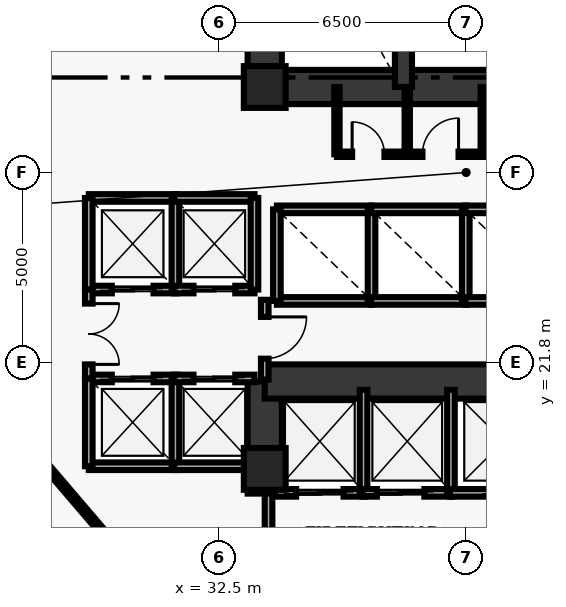
"""IFC4 building model, lengths in metres.
Left out: names, types, materials, properties, quantities, classifications, styles, units other than length and angle.
Written with IfcOpenShell. Run it as: python <this file> out.ifc"""

import sys

from ifc_helpers import new_model, si_unit, direction, frame, frame_2d, origin, origin_2d, place, context, subcontext, project, spatial, rectangle, extrude, element, fill, save


model = new_model("IFC4")
c1 = context("Model", 3, precision=1e-05, world=origin(), true_north=direction((0.0, 1.0)))
c2 = subcontext(c1, "Body", "Model", "MODEL_VIEW")
j1 = project(units=[si_unit("LENGTHUNIT", "METRE"), si_unit("PLANEANGLEUNIT", "RADIAN")], contexts=[c1])
p1 = place(None, origin())
s1 = spatial("IfcSite", under=j1, at=p1, CompositionType="ELEMENT")
p2 = place(p1, origin())
s2 = spatial("IfcBuilding", under=s1, at=p2, CompositionType="ELEMENT")
p3 = place(p2, frame((0.0, 0.0, 6.0)))
s3 = spatial("IfcBuildingStorey", under=s2, at=p3, CompositionType="ELEMENT", Elevation=6.0)
for number, where, z_axis, x_axis in (
    (1, (33.7, 19.0, 0.0), (0.0, 0.0, 1.0), (1.0, 0.0, 0.0)),
    (2, (33.7, 29.05, 0.0), (0.0, 0.0, 1.0), (1.0, 0.0, 0.0)),
):
    element("IfcColumn", number, at=place(p3, frame(where, z_axis=z_axis, x_axis=x_axis)), inside=s3, PredefinedType="PILASTER", context=c2, shape_type="SweptSolid", body=[
        extrude(rectangle(XDim=1.1, YDim=1.1, at=origin_2d()), origin(), (0.0, 0.0, 1.0), 4.7),
    ])
p4 = place(p3, frame((33.7, 29.05, 0.0), z_axis=(0.0, 0.0, 1.0), x_axis=(0.0, 1.0, 0.0)))
e3 = element("IfcWall", 3, at=p4, inside=s3, PredefinedType="SHEAR", context=c2, shape_type="SweptSolid", body=[
    extrude(rectangle(XDim=8.35, YDim=0.9, at=frame_2d((4.175, 0.0))), origin(), (0.0, 0.0, 1.0), 4.7),
])
p5 = place(p3, frame((33.7, 18.35, 0.0), z_axis=(0.0, 0.0, 1.0), x_axis=(0.0, 1.0, 0.0)))
e4 = element("IfcWall", 4, at=p5, inside=s3, PredefinedType="SHEAR", context=c2, shape_type="SweptSolid", body=[
    extrude(rectangle(XDim=2.95, YDim=0.9, at=frame_2d((1.475, 0.0))), origin(), (0.0, 0.0, 1.0), 4.7),
])
p6 = place(p3, frame((33.7, 29.05, 0.0), z_axis=(0.0, 0.0, 1.0), x_axis=(1.0, 0.0, 0.0)))
e5 = element("IfcWall", 5, at=p6, inside=s3, PredefinedType="SHEAR", context=c2, shape_type="SweptSolid", body=[
    extrude(rectangle(XDim=10.6, YDim=0.9, at=frame_2d((5.3, 0.0))), origin(), (0.0, 0.0, 1.0), 4.7),
])
p7 = place(p3, frame((33.7, 21.3, 0.0), z_axis=(0.0, 0.0, 1.0), x_axis=(1.0, 0.0, 0.0)))
e6 = element("IfcWall", 6, at=p7, inside=s3, PredefinedType="SHEAR", context=c2, shape_type="SweptSolid", body=[
    extrude(rectangle(XDim=7.55, YDim=0.9, at=frame_2d((3.775, 0.0))), origin(), (0.0, 0.0, 1.0), 4.7),
])
p8 = place(p3, frame((37.35, 29.05, 0.0), z_axis=(0.0, 0.0, 1.0), x_axis=(0.0, 1.0, 0.0)))
e7 = element("IfcWall", 7, at=p8, inside=s3, PredefinedType="SHEAR", context=c2, shape_type="SweptSolid", body=[
    extrude(rectangle(XDim=8.35, YDim=0.45, at=frame_2d((4.175, 0.0))), origin(), (0.0, 0.0, 1.0), 4.7),
])
p9 = place(p3, frame((35.6, 27.28, 0.0), z_axis=(0.0, 0.0, 1.0), x_axis=(0.0, 1.0, 0.0)))
e8 = element("IfcWall", 8, at=p9, inside=s3, PredefinedType="PARTITIONING", context=c2, shape_type="SweptSolid", body=[
    extrude(rectangle(XDim=1.77, YDim=0.14, at=frame_2d((0.885, 0.0))), origin(), (0.0, 0.0, 1.0), 4.7),
])
p10 = place(p3, frame((29.07, 23.72, 0.0), z_axis=(0.0, 0.0, 1.0), x_axis=(1.0, 0.0, 0.0)))
e9 = element("IfcWall", 9, at=p10, inside=s3, PredefinedType="SOLIDWALL", context=c2, shape_type="SweptSolid", body=[
    extrude(rectangle(XDim=2.31, YDim=0.2, at=frame_2d((1.155, 0.0))), origin(), (0.0, 0.0, 1.0), 4.7),
])
p11 = place(p10, frame((0.605, 0.0, 0.0)))
e10 = element("IfcOpeningElement", 10, at=p11, cuts=e9, PredefinedType="OPENING", context=c2, shape_type="SweptSolid", body=[
    extrude(rectangle(XDim=1.1, YDim=2.15, at=frame_2d((0.55, 1.075))), frame((0.0, 0.11, 0.0), z_axis=(0.0, -1.0, 0.0), x_axis=(1.0, 0.0, 0.0)), (0.0, 0.0, 1.0), 0.22),
])
p12 = place(p3, frame((29.07, 26.13, 0.0), z_axis=(0.0, 0.0, 1.0), x_axis=(1.0, 0.0, 0.0)))
e11 = element("IfcWall", 11, at=p12, inside=s3, PredefinedType="SOLIDWALL", context=c2, shape_type="SweptSolid", body=[
    extrude(rectangle(XDim=2.31, YDim=0.2, at=frame_2d((1.155, 0.0))), origin(), (0.0, 0.0, 1.0), 4.7),
])
for number, where, z_axis, x_axis in (
    (12, (29.07, 23.72, 0.0), (0.0, 0.0, 1.0), (0.0, 1.0, 0.0)),
    (13, (31.35, 23.72, 0.0), (0.0, 0.0, 1.0), (0.0, 1.0, 0.0)),
):
    element("IfcWall", number, at=place(p3, frame(where, z_axis=z_axis, x_axis=x_axis)), inside=s3, PredefinedType="SOLIDWALL", context=c2, shape_type="SweptSolid", body=[
        extrude(rectangle(XDim=2.41, YDim=0.2, at=frame_2d((1.205, 0.0))), origin(), (0.0, 0.0, 1.0), 4.7),
    ])
p13 = place(p3, frame((31.32, 23.72, 0.0), z_axis=(0.0, 0.0, 1.0), x_axis=(1.0, 0.0, 0.0)))
e14 = element("IfcWall", 14, at=p13, inside=s3, PredefinedType="SOLIDWALL", context=c2, shape_type="SweptSolid", body=[
    extrude(rectangle(XDim=2.11, YDim=0.2, at=frame_2d((1.055, 0.0))), origin(), (0.0, 0.0, 1.0), 4.7),
])
p14 = place(p13, frame((0.505, 0.0, 0.0)))
e15 = element("IfcOpeningElement", 15, at=p14, cuts=e14, PredefinedType="OPENING", context=c2, shape_type="SweptSolid", body=[
    extrude(rectangle(XDim=1.1, YDim=2.15, at=frame_2d((0.55, 1.075))), frame((0.0, 0.11, 0.0), z_axis=(0.0, -1.0, 0.0), x_axis=(1.0, 0.0, 0.0)), (0.0, 0.0, 1.0), 0.22),
])
p15 = place(p3, frame((31.32, 26.13, 0.0), z_axis=(0.0, 0.0, 1.0), x_axis=(1.0, 0.0, 0.0)))
e16 = element("IfcWall", 16, at=p15, inside=s3, PredefinedType="SOLIDWALL", context=c2, shape_type="SweptSolid", body=[
    extrude(rectangle(XDim=2.11, YDim=0.2, at=frame_2d((1.055, 0.0))), origin(), (0.0, 0.0, 1.0), 4.7),
])
p16 = place(p3, frame((33.43, 23.72, 0.0), z_axis=(0.0, 0.0, 1.0), x_axis=(0.0, 1.0, 0.0)))
e17 = element("IfcWall", 17, at=p16, inside=s3, PredefinedType="SOLIDWALL", context=c2, shape_type="SweptSolid", body=[
    extrude(rectangle(XDim=2.41, YDim=0.2, at=frame_2d((1.205, 0.0))), origin(), (0.0, 0.0, 1.0), 4.7),
])
p17 = place(p3, frame((29.07, 19.07, 0.0), z_axis=(0.0, 0.0, 1.0), x_axis=(1.0, 0.0, 0.0)))
e18 = element("IfcWall", 18, at=p17, inside=s3, PredefinedType="SOLIDWALL", context=c2, shape_type="SweptSolid", body=[
    extrude(rectangle(XDim=2.31, YDim=0.2, at=frame_2d((1.155, 0.0))), origin(), (0.0, 0.0, 1.0), 4.7),
])
p18 = place(p3, frame((29.07, 21.38, 0.0), z_axis=(0.0, 0.0, 1.0), x_axis=(1.0, 0.0, 0.0)))
e19 = element("IfcWall", 19, at=p18, inside=s3, PredefinedType="SOLIDWALL", context=c2, shape_type="SweptSolid", body=[
    extrude(rectangle(XDim=2.31, YDim=0.2, at=frame_2d((1.155, 0.0))), origin(), (0.0, 0.0, 1.0), 4.7),
])
p19 = place(p18, frame((0.605, 0.0, 0.0)))
e20 = element("IfcOpeningElement", 20, at=p19, cuts=e19, PredefinedType="OPENING", context=c2, shape_type="SweptSolid", body=[
    extrude(rectangle(XDim=1.1, YDim=2.15, at=frame_2d((0.55, 1.075))), frame((0.0, 0.11, 0.0), z_axis=(0.0, -1.0, 0.0), x_axis=(1.0, 0.0, 0.0)), (0.0, 0.0, 1.0), 0.22),
])
for number, where, z_axis, x_axis in (
    (21, (29.07, 19.07, 0.0), (0.0, 0.0, 1.0), (0.0, 1.0, 0.0)),
    (22, (31.35, 19.07, 0.0), (0.0, 0.0, 1.0), (0.0, 1.0, 0.0)),
):
    element("IfcWall", number, at=place(p3, frame(where, z_axis=z_axis, x_axis=x_axis)), inside=s3, PredefinedType="SOLIDWALL", context=c2, shape_type="SweptSolid", body=[
        extrude(rectangle(XDim=2.31, YDim=0.2, at=frame_2d((1.155, 0.0))), origin(), (0.0, 0.0, 1.0), 4.7),
    ])
p20 = place(p3, frame((31.32, 19.07, 0.0), z_axis=(0.0, 0.0, 1.0), x_axis=(1.0, 0.0, 0.0)))
e23 = element("IfcWall", 23, at=p20, inside=s3, PredefinedType="SOLIDWALL", context=c2, shape_type="SweptSolid", body=[
    extrude(rectangle(XDim=2.11, YDim=0.2, at=frame_2d((1.055, 0.0))), origin(), (0.0, 0.0, 1.0), 4.7),
])
p21 = place(p3, frame((31.32, 21.38, 0.0), z_axis=(0.0, 0.0, 1.0), x_axis=(1.0, 0.0, 0.0)))
e24 = element("IfcWall", 24, at=p21, inside=s3, PredefinedType="SOLIDWALL", context=c2, shape_type="SweptSolid", body=[
    extrude(rectangle(XDim=2.11, YDim=0.2, at=frame_2d((1.055, 0.0))), origin(), (0.0, 0.0, 1.0), 4.7),
])
p22 = place(p21, frame((0.505, 0.0, 0.0)))
e25 = element("IfcOpeningElement", 25, at=p22, cuts=e24, PredefinedType="OPENING", context=c2, shape_type="SweptSolid", body=[
    extrude(rectangle(XDim=1.1, YDim=2.15, at=frame_2d((0.55, 1.075))), frame((0.0, 0.11, 0.0), z_axis=(0.0, -1.0, 0.0), x_axis=(1.0, 0.0, 0.0)), (0.0, 0.0, 1.0), 0.22),
])
for number, where, z_axis, x_axis in (
    (26, (34.02, 23.42, 0.0), (0.0, 0.0, 1.0), (1.0, 0.0, 0.0)),
    (27, (34.02, 25.83, 0.0), (0.0, 0.0, 1.0), (1.0, 0.0, 0.0)),
):
    element("IfcWall", number, at=place(p3, frame(where, z_axis=z_axis, x_axis=x_axis)), inside=s3, PredefinedType="SOLIDWALL", context=c2, shape_type="SweptSolid", body=[
        extrude(rectangle(XDim=2.5, YDim=0.2, at=frame_2d((1.25, 0.0))), origin(), (0.0, 0.0, 1.0), 4.7),
    ])
for number, where, z_axis, x_axis in (
    (28, (34.02, 23.42, 0.0), (0.0, 0.0, 1.0), (0.0, 1.0, 0.0)),
    (29, (36.51, 23.42, 0.0), (0.0, 0.0, 1.0), (0.0, 1.0, 0.0)),
):
    element("IfcWall", number, at=place(p3, frame(where, z_axis=z_axis, x_axis=x_axis)), inside=s3, PredefinedType="SOLIDWALL", context=c2, shape_type="SweptSolid", body=[
        extrude(rectangle(XDim=2.41, YDim=0.2, at=frame_2d((1.205, 0.0))), origin(), (0.0, 0.0, 1.0), 4.7),
    ])
for number, where, z_axis, x_axis in (
    (30, (36.5, 23.42, 0.0), (0.0, 0.0, 1.0), (1.0, 0.0, 0.0)),
    (31, (36.5, 25.83, 0.0), (0.0, 0.0, 1.0), (1.0, 0.0, 0.0)),
):
    element("IfcWall", number, at=place(p3, frame(where, z_axis=z_axis, x_axis=x_axis)), inside=s3, PredefinedType="SOLIDWALL", context=c2, shape_type="SweptSolid", body=[
        extrude(rectangle(XDim=2.5, YDim=0.2, at=frame_2d((1.25, 0.0))), origin(), (0.0, 0.0, 1.0), 4.7),
    ])
p23 = place(p3, frame((38.99, 23.42, 0.0), z_axis=(0.0, 0.0, 1.0), x_axis=(0.0, 1.0, 0.0)))
e32 = element("IfcWall", 32, at=p23, inside=s3, PredefinedType="SOLIDWALL", context=c2, shape_type="SweptSolid", body=[
    extrude(rectangle(XDim=2.41, YDim=0.2, at=frame_2d((1.205, 0.0))), origin(), (0.0, 0.0, 1.0), 4.7),
])
for number, where, z_axis, x_axis in (
    (33, (38.98, 23.42, 0.0), (0.0, 0.0, 1.0), (1.0, 0.0, 0.0)),
    (34, (38.98, 25.83, 0.0), (0.0, 0.0, 1.0), (1.0, 0.0, 0.0)),
):
    element("IfcWall", number, at=place(p3, frame(where, z_axis=z_axis, x_axis=x_axis)), inside=s3, PredefinedType="SOLIDWALL", context=c2, shape_type="SweptSolid", body=[
        extrude(rectangle(XDim=2.5, YDim=0.2, at=frame_2d((1.25, 0.0))), origin(), (0.0, 0.0, 1.0), 4.7),
    ])
p24 = place(p3, frame((33.97, 18.37, 0.0), z_axis=(0.0, 0.0, 1.0), x_axis=(1.0, 0.0, 0.0)))
e35 = element("IfcWall", 35, at=p24, inside=s3, PredefinedType="SOLIDWALL", context=c2, shape_type="SweptSolid", body=[
    extrude(rectangle(XDim=2.36, YDim=0.2, at=frame_2d((1.18, 0.0))), origin(), (0.0, 0.0, 1.0), 4.7),
])
p25 = place(p24, frame((0.555, 0.0, 0.0)))
e36 = element("IfcOpeningElement", 36, at=p25, cuts=e35, PredefinedType="OPENING", context=c2, shape_type="SweptSolid", body=[
    extrude(rectangle(XDim=1.25, YDim=2.2, at=frame_2d((0.625, 1.1))), frame((0.0, 0.11, 0.0), z_axis=(0.0, -1.0, 0.0), x_axis=(1.0, 0.0, 0.0)), (0.0, 0.0, 1.0), 0.22),
])
p26 = place(p3, frame((36.3, 18.37, 0.0), z_axis=(0.0, 0.0, 1.0), x_axis=(0.0, 1.0, 0.0)))
e37 = element("IfcWall", 37, at=p26, inside=s3, PredefinedType="SOLIDWALL", context=c2, shape_type="SweptSolid", body=[
    extrude(rectangle(XDim=2.71, YDim=0.2, at=frame_2d((1.355, 0.0))), origin(), (0.0, 0.0, 1.0), 4.7),
])
p27 = place(p3, frame((36.27, 18.37, 0.0), z_axis=(0.0, 0.0, 1.0), x_axis=(1.0, 0.0, 0.0)))
e38 = element("IfcWall", 38, at=p27, inside=s3, PredefinedType="SOLIDWALL", context=c2, shape_type="SweptSolid", body=[
    extrude(rectangle(XDim=2.36, YDim=0.2, at=frame_2d((1.18, 0.0))), origin(), (0.0, 0.0, 1.0), 4.7),
])
p28 = place(p27, frame((0.38, 0.0, 0.0)))
e39 = element("IfcOpeningElement", 39, at=p28, cuts=e38, PredefinedType="OPENING", context=c2, shape_type="SweptSolid", body=[
    extrude(rectangle(XDim=1.25, YDim=2.2, at=frame_2d((0.625, 1.1))), frame((0.0, 0.11, 0.0), z_axis=(0.0, -1.0, 0.0), x_axis=(1.0, 0.0, 0.0)), (0.0, 0.0, 1.0), 0.22),
])
p29 = place(p3, frame((38.6, 18.37, 0.0), z_axis=(0.0, 0.0, 1.0), x_axis=(0.0, 1.0, 0.0)))
e40 = element("IfcWall", 40, at=p29, inside=s3, PredefinedType="SOLIDWALL", context=c2, shape_type="SweptSolid", body=[
    extrude(rectangle(XDim=2.71, YDim=0.2, at=frame_2d((1.355, 0.0))), origin(), (0.0, 0.0, 1.0), 4.7),
])
p30 = place(p3, frame((38.57, 18.37, 0.0), z_axis=(0.0, 0.0, 1.0), x_axis=(1.0, 0.0, 0.0)))
e41 = element("IfcWall", 41, at=p30, inside=s3, PredefinedType="SOLIDWALL", context=c2, shape_type="SweptSolid", body=[
    extrude(rectangle(XDim=2.83, YDim=0.2, at=frame_2d((1.415, 0.0))), origin(), (0.0, 0.0, 1.0), 4.7),
])
p31 = place(p30, frame((1.18, 0.0, 0.0)))
e42 = element("IfcOpeningElement", 42, at=p31, cuts=e41, PredefinedType="OPENING", context=c2, shape_type="SweptSolid", body=[
    extrude(rectangle(XDim=1.35, YDim=2.18, at=frame_2d((0.675, 1.09))), frame((0.0, 0.11, 0.0), z_axis=(0.0, -1.0, 0.0), x_axis=(1.0, 0.0, 0.0)), (0.0, 0.0, 1.0), 0.22),
])
p32 = place(p3, frame((29.07, 21.38, 0.0), z_axis=(0.0, 0.0, 1.0), x_axis=(0.0, 1.0, 0.0)))
e43 = element("IfcWall", 43, at=p32, inside=s3, PredefinedType="SOLIDWALL", context=c2, shape_type="SweptSolid", body=[
    extrude(rectangle(XDim=2.34, YDim=0.2, at=frame_2d((1.17, 0.0))), origin(), (0.0, 0.0, 1.0), 4.7),
])
p33 = place(p32, frame((0.37, 0.0, 0.0)))
e44 = element("IfcOpeningElement", 44, at=p33, cuts=e43, PredefinedType="OPENING", context=c2, shape_type="SweptSolid", body=[
    extrude(rectangle(XDim=1.6, YDim=2.2, at=frame_2d((0.8, 1.1))), frame((0.0, 0.11, 0.0), z_axis=(0.0, -1.0, 0.0), x_axis=(1.0, 0.0, 0.0)), (0.0, 0.0, 1.0), 0.22),
])
p34 = place(p3, frame((33.7, 21.35, 0.0), z_axis=(0.0, 0.0, 1.0), x_axis=(0.0, 1.0, 0.0)))
e45 = element("IfcWall", 45, at=p34, inside=s3, PredefinedType="SOLIDWALL", context=c2, shape_type="SweptSolid", body=[
    extrude(rectangle(XDim=2.1, YDim=0.2, at=frame_2d((1.05, 0.0))), origin(), (0.0, 0.0, 1.0), 3.92),
])
p35 = place(p34, frame((0.55, 0.0, 0.0)))
e46 = element("IfcOpeningElement", 46, at=p35, cuts=e45, PredefinedType="OPENING", context=c2, shape_type="SweptSolid", body=[
    extrude(rectangle(XDim=1.1, YDim=2.15, at=frame_2d((0.55, 1.075))), frame((0.0, 0.11, 0.0), z_axis=(0.0, -1.0, 0.0), x_axis=(1.0, 0.0, 0.0)), (0.0, 0.0, 1.0), 0.22),
])
p36 = place(p3, frame((33.8, 15.55, 0.0), z_axis=(0.0, 0.0, 1.0), x_axis=(0.0, 1.0, 0.0)))
e47 = element("IfcWall", 47, at=p36, inside=s3, PredefinedType="SOLIDWALL", context=c2, shape_type="SweptSolid", body=[
    extrude(rectangle(XDim=2.8, YDim=0.2, at=frame_2d((1.4, 0.0))), origin(), (0.0, 0.0, 1.0), 4.7),
])
p37 = place(p3, frame((35.6, 27.28, 0.0), z_axis=(0.0, 0.0, 1.0), x_axis=(1.0, 0.0, 0.0)))
e48 = element("IfcWall", 48, at=p37, inside=s3, PredefinedType="PARTITIONING", context=c2, shape_type="SweptSolid", body=[
    extrude(rectangle(XDim=5.4, YDim=0.14, at=frame_2d((2.7, 0.0))), origin(), (0.0, 0.0, 1.0), 4.7),
])
p38 = place(p37, frame((0.4, 0.0, 0.0)))
e49 = element("IfcOpeningElement", 49, at=p38, cuts=e48, PredefinedType="OPENING", context=c2, shape_type="SweptSolid", body=[
    extrude(rectangle(XDim=0.85, YDim=2.1, at=frame_2d((0.425, 1.05))), frame((0.0, 0.08, 0.0), z_axis=(0.0, -1.0, 0.0), x_axis=(1.0, 0.0, 0.0)), (0.0, 0.0, 1.0), 0.16),
])
p39 = place(p37, frame((2.25, 0.0, 0.0)))
e50 = element("IfcOpeningElement", 50, at=p39, cuts=e48, PredefinedType="OPENING", context=c2, shape_type="SweptSolid", body=[
    extrude(rectangle(XDim=0.95, YDim=2.1, at=frame_2d((0.475, 1.05))), frame((0.0, 0.08, 0.0), z_axis=(0.0, -1.0, 0.0), x_axis=(1.0, 0.0, 0.0)), (0.0, 0.0, 1.0), 0.16),
])
p40 = place(p37, frame((4.2, 0.0, 0.0)))
e51 = element("IfcOpeningElement", 51, at=p40, cuts=e48, PredefinedType="OPENING", context=c2, shape_type="SweptSolid", body=[
    extrude(rectangle(XDim=0.8, YDim=2.05, at=frame_2d((0.4, 1.025))), frame((0.0, 0.08, 0.0), z_axis=(0.0, -1.0, 0.0), x_axis=(1.0, 0.0, 0.0)), (0.0, 0.0, 1.0), 0.16),
])
for number, where, z_axis, x_axis in (
    (52, (37.45, 27.28, 0.0), (0.0, 0.0, 1.0), (0.0, 1.0, 0.0)),
    (53, (39.45, 27.28, 0.0), (0.0, 0.0, 1.0), (0.0, 1.0, 0.0)),
):
    element("IfcWall", number, at=place(p3, frame(where, z_axis=z_axis, x_axis=x_axis)), inside=s3, PredefinedType="PARTITIONING", context=c2, shape_type="SweptSolid", body=[
        extrude(rectangle(XDim=1.77, YDim=0.14, at=frame_2d((0.885, 0.0))), origin(), (0.0, 0.0, 1.0), 4.7),
    ])
p41 = place(p3, frame((27.811, 19.24, 0.0), z_axis=(0.0, 0.0, 1.0), x_axis=(0.649652680018, -0.760231145998, 0.0)))
e54 = element("IfcWall", 54, at=p41, inside=s3, PredefinedType="PARTITIONING", context=c2, shape_type="SweptSolid", body=[
    extrude(rectangle(XDim=7.279, YDim=0.16, at=frame_2d((3.64, 0.0))), origin(), (0.0, 0.0, 1.0), 4.7),
])
p42 = place(p11, origin())
e55 = element("IfcDoor", 55, at=p42, inside=s3, OperationType="DOUBLE_DOOR_SLIDING", PredefinedType="DOOR", context=c2, shape_type="SweptSolid", body=[
    extrude(rectangle(XDim=1.1, YDim=2.15, at=frame_2d((0.55, 1.075))), frame((0.0, 0.025, 0.0), z_axis=(0.0, -1.0, 0.0), x_axis=(1.0, 0.0, 0.0)), (0.0, 0.0, 1.0), 0.05),
])
fill(e10, e55)
p43 = place(p14, origin())
e56 = element("IfcDoor", 56, at=p43, inside=s3, OperationType="DOUBLE_DOOR_SLIDING", PredefinedType="DOOR", context=c2, shape_type="SweptSolid", body=[
    extrude(rectangle(XDim=1.1, YDim=2.15, at=frame_2d((0.55, 1.075))), frame((0.0, 0.025, 0.0), z_axis=(0.0, -1.0, 0.0), x_axis=(1.0, 0.0, 0.0)), (0.0, 0.0, 1.0), 0.05),
])
fill(e15, e56)
p44 = place(p19, origin())
e57 = element("IfcDoor", 57, at=p44, inside=s3, OperationType="DOUBLE_DOOR_SLIDING", PredefinedType="DOOR", context=c2, shape_type="SweptSolid", body=[
    extrude(rectangle(XDim=1.1, YDim=2.15, at=frame_2d((0.55, 1.075))), frame((0.0, 0.025, 0.0), z_axis=(0.0, -1.0, 0.0), x_axis=(1.0, 0.0, 0.0)), (0.0, 0.0, 1.0), 0.05),
])
fill(e20, e57)
p45 = place(p22, origin())
e58 = element("IfcDoor", 58, at=p45, inside=s3, OperationType="DOUBLE_DOOR_SLIDING", PredefinedType="DOOR", context=c2, shape_type="SweptSolid", body=[
    extrude(rectangle(XDim=1.1, YDim=2.15, at=frame_2d((0.55, 1.075))), frame((0.0, 0.025, 0.0), z_axis=(0.0, -1.0, 0.0), x_axis=(1.0, 0.0, 0.0)), (0.0, 0.0, 1.0), 0.05),
])
fill(e25, e58)
p46 = place(p25, origin())
e59 = element("IfcDoor", 59, at=p46, inside=s3, OperationType="DOUBLE_DOOR_SLIDING", PredefinedType="DOOR", context=c2, shape_type="SweptSolid", body=[
    extrude(rectangle(XDim=1.25, YDim=2.2, at=frame_2d((0.625, 1.1))), frame((0.0, 0.025, 0.0), z_axis=(0.0, -1.0, 0.0), x_axis=(1.0, 0.0, 0.0)), (0.0, 0.0, 1.0), 0.05),
])
fill(e36, e59)
p47 = place(p28, origin())
e60 = element("IfcDoor", 60, at=p47, inside=s3, OperationType="DOUBLE_DOOR_SLIDING", PredefinedType="DOOR", context=c2, shape_type="SweptSolid", body=[
    extrude(rectangle(XDim=1.25, YDim=2.2, at=frame_2d((0.625, 1.1))), frame((0.0, 0.025, 0.0), z_axis=(0.0, -1.0, 0.0), x_axis=(1.0, 0.0, 0.0)), (0.0, 0.0, 1.0), 0.05),
])
fill(e39, e60)
p48 = place(p33, origin())
e61 = element("IfcDoor", 61, at=p48, inside=s3, OperationType="DOUBLE_DOOR_SINGLE_SWING", PredefinedType="DOOR", context=c2, shape_type="SweptSolid", body=[
    extrude(rectangle(XDim=1.6, YDim=2.2, at=frame_2d((0.8, 1.1))), frame((0.0, 0.025, 0.0), z_axis=(0.0, -1.0, 0.0), x_axis=(1.0, 0.0, 0.0)), (0.0, 0.0, 1.0), 0.05),
])
fill(e44, e61)
p49 = place(p35, origin())
e62 = element("IfcDoor", 62, at=p49, inside=s3, OperationType="SINGLE_SWING_RIGHT", PredefinedType="DOOR", context=c2, shape_type="SweptSolid", body=[
    extrude(rectangle(XDim=1.1, YDim=2.15, at=frame_2d((0.55, 1.075))), frame((0.0, 0.025, 0.0), z_axis=(0.0, -1.0, 0.0), x_axis=(1.0, 0.0, 0.0)), (0.0, 0.0, 1.0), 0.05),
])
fill(e46, e62)
p50 = place(p38, origin())
e63 = element("IfcDoor", 63, at=p50, inside=s3, OperationType="SINGLE_SWING_LEFT", PredefinedType="DOOR", context=c2, shape_type="SweptSolid", body=[
    extrude(rectangle(XDim=0.85, YDim=2.1, at=frame_2d((0.425, 1.05))), frame((0.0, 0.025, 0.0), z_axis=(0.0, -1.0, 0.0), x_axis=(1.0, 0.0, 0.0)), (0.0, 0.0, 1.0), 0.05),
])
fill(e49, e63)
p51 = place(p39, origin())
e64 = element("IfcDoor", 64, at=p51, inside=s3, OperationType="SINGLE_SWING_RIGHT", PredefinedType="DOOR", context=c2, shape_type="SweptSolid", body=[
    extrude(rectangle(XDim=0.95, YDim=2.1, at=frame_2d((0.475, 1.05))), frame((0.0, 0.025, 0.0), z_axis=(0.0, -1.0, 0.0), x_axis=(1.0, 0.0, 0.0)), (0.0, 0.0, 1.0), 0.05),
])
fill(e50, e64)
save(model, sys.argv[1])
